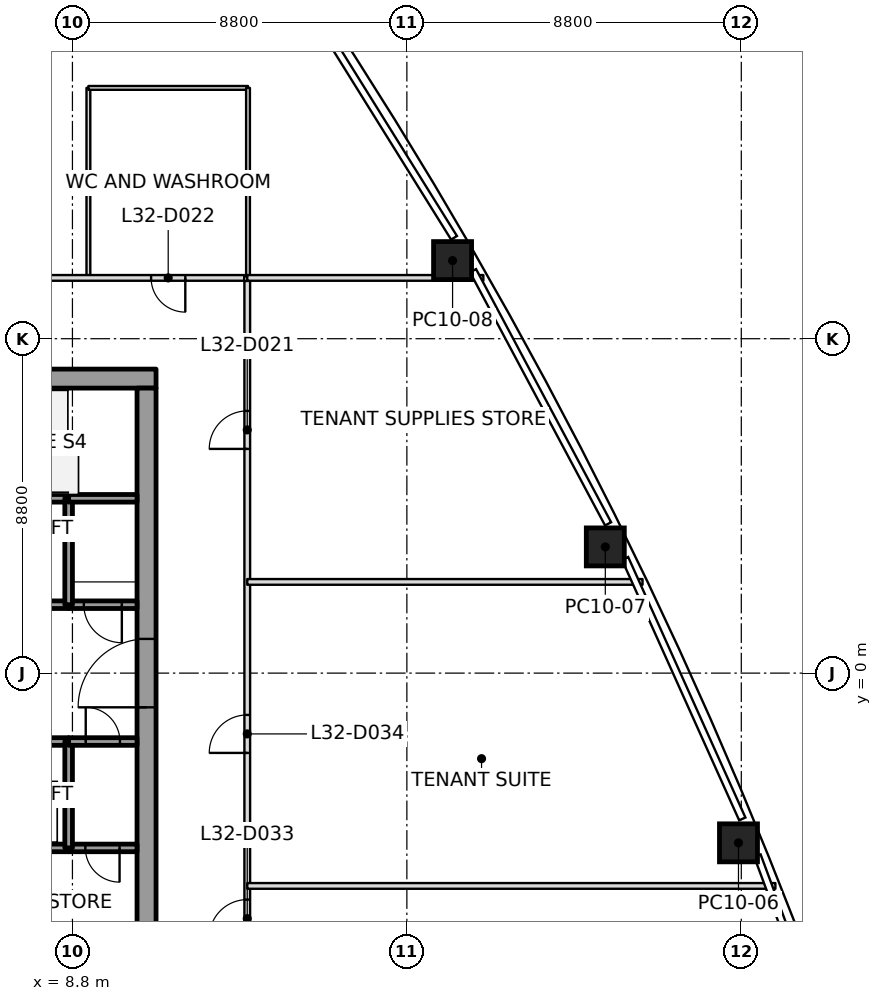
"""IFC4 building model, lengths in metres.
Left out: names, types, materials, properties, quantities, classifications, styles, units other than length and angle.
Written with IfcOpenShell. Run it as: python <this file> out.ifc"""

import sys

from ifc_helpers import new_model, si_unit, direction, frame, frame_2d, origin, origin_2d, place, context, subcontext, project, spatial, rectangle, extrude, element, fill, save


model = new_model("IFC4")
c1 = context("Model", 3, precision=1e-05, world=origin(), true_north=direction((0.0, 1.0)))
c2 = subcontext(c1, "Body", "Model", "MODEL_VIEW")
j1 = project(units=[si_unit("LENGTHUNIT", "METRE"), si_unit("PLANEANGLEUNIT", "RADIAN")], contexts=[c1])
p1 = place(None, origin())
s1 = spatial("IfcSite", under=j1, at=p1, CompositionType="ELEMENT")
p2 = place(p1, origin())
s2 = spatial("IfcBuilding", under=s1, at=p2, CompositionType="ELEMENT")
p3 = place(p2, frame((0.0, 0.0, 149.8)))
s3 = spatial("IfcBuildingStorey", under=s2, at=p3, CompositionType="ELEMENT", Elevation=149.8)
p4 = place(p3, frame((26.326, -4.466, 0.0), z_axis=(-0.017879535448, 0.010068680372, 0.999789449778), x_axis=(-0.379426178831, 0.925081893574, -0.016101707937)))
e1 = element("IfcColumn", 1, at=p4, inside=s3, PredefinedType="COLUMN", context=c2, shape_type="SweptSolid", body=[
    extrude(rectangle(XDim=1.0, YDim=1.0, at=origin_2d()), origin(), (0.0, 0.0, 1.0), 4.001),
])
p5 = place(p3, frame((22.822, 3.321, 0.0), z_axis=(-0.014097689605, 0.002074984617, 0.999898469639), x_axis=(-0.440692979973, 0.897621564819, -0.008076123754)))
e2 = element("IfcColumn", 2, at=p5, inside=s3, PredefinedType="COLUMN", context=c2, shape_type="SweptSolid", body=[
    extrude(rectangle(XDim=1.0, YDim=1.0, at=origin_2d()), origin(), (0.0, 0.0, 1.0), 4.0),
])
p6 = place(p3, frame((18.802, 10.856, 0.0), z_axis=(-0.009826027463, -0.005675904062, 0.999935614576), x_axis=(-0.499975861713, 0.866039339578, 2.779837e-06)))
e3 = element("IfcColumn", 3, at=p6, inside=s3, PredefinedType="COLUMN", context=c2, shape_type="SweptSolid", body=[
    extrude(rectangle(XDim=1.0, YDim=1.0, at=origin_2d()), origin(), (0.0, 0.0, 1.0), 4.0),
])
p7 = place(p3, frame((-11.0, 7.75, 0.0), z_axis=(0.0, 0.0, 1.0), x_axis=(1.0, 0.0, 0.0)))
e4 = element("IfcWall", 4, at=p7, inside=s3, PredefinedType="SHEAR", context=c2, shape_type="SweptSolid", body=[
    extrude(rectangle(XDim=22.0, YDim=0.5, at=frame_2d((11.0, 0.0))), origin(), (0.0, 0.0, 1.0), 4.0),
])
p8 = place(p7, frame((10.45, 0.0, 0.0)))
e5 = element("IfcOpeningElement", 5, at=p8, cuts=e4, PredefinedType="OPENING", context=c2, shape_type="SweptSolid", body=[
    extrude(rectangle(XDim=1.1, YDim=2.1, at=frame_2d((0.55, 1.05))), frame((0.0, 0.25, 0.0), z_axis=(0.0, -1.0, 0.0), x_axis=(1.0, 0.0, 0.0)), (0.0, 0.0, 1.0), 0.5),
])
p9 = place(p3, frame((10.75, -7.5, 0.0), z_axis=(0.0, 0.0, 1.0), x_axis=(0.0, 1.0, 0.0)))
e6 = element("IfcWall", 6, at=p9, inside=s3, PredefinedType="SHEAR", context=c2, shape_type="SweptSolid", body=[
    extrude(rectangle(XDim=15.0, YDim=0.5, at=frame_2d((7.5, 0.0))), origin(), (0.0, 0.0, 1.0), 4.0),
])
p10 = place(p9, frame((6.6, 0.0, 0.0)))
e7 = element("IfcOpeningElement", 7, at=p10, cuts=e6, PredefinedType="OPENING", context=c2, shape_type="SweptSolid", body=[
    extrude(rectangle(XDim=1.8, YDim=2.1, at=frame_2d((0.9, 1.05))), frame((0.0, 0.25, 0.0), z_axis=(0.0, -1.0, 0.0), x_axis=(1.0, 0.0, 0.0)), (0.0, 0.0, 1.0), 0.5),
])
p11 = place(p3, frame((8.7, -4.6, 0.0), z_axis=(0.0, 0.0, 1.0), x_axis=(-1.0, 0.0, 0.0)))
e8 = element("IfcWall", 8, at=p11, inside=s3, PredefinedType="SOLIDWALL", context=c2, shape_type="SweptSolid", body=[
    extrude(rectangle(XDim=2.6, YDim=0.2, at=frame_2d((1.3, 0.0))), origin(), (0.0, 0.0, 1.0), 3.85),
])
p12 = place(p3, frame((6.1, -1.8, 0.0), z_axis=(0.0, 0.0, 1.0), x_axis=(1.0, 0.0, 0.0)))
e9 = element("IfcWall", 9, at=p12, inside=s3, PredefinedType="SOLIDWALL", context=c2, shape_type="SweptSolid", body=[
    extrude(rectangle(XDim=2.6, YDim=0.2, at=frame_2d((1.3, 0.0))), origin(), (0.0, 0.0, 1.0), 3.85),
])
p13 = place(p12, frame((0.75, 0.0, 0.0)))
e10 = element("IfcOpeningElement", 10, at=p13, cuts=e9, PredefinedType="OPENING", context=c2, shape_type="SweptSolid", body=[
    extrude(rectangle(XDim=1.1, YDim=2.1, at=frame_2d((0.55, 1.05))), frame((0.0, 0.1, 0.0), z_axis=(0.0, -1.0, 0.0), x_axis=(1.0, 0.0, 0.0)), (0.0, 0.0, 1.0), 0.2),
])
for number, where, z_axis, x_axis in (
    (11, (8.7, 1.8, 0.0), (0.0, 0.0, 1.0), (-1.0, 0.0, 0.0)),
    (12, (8.7, 4.6, 0.0), (0.0, 0.0, 1.0), (-1.0, 0.0, 0.0)),
):
    element("IfcWall", number, at=place(p3, frame(where, z_axis=z_axis, x_axis=x_axis)), inside=s3, PredefinedType="SOLIDWALL", context=c2, shape_type="SweptSolid", body=[
        extrude(rectangle(XDim=2.6, YDim=0.2, at=frame_2d((1.3, 0.0))), origin(), (0.0, 0.0, 1.0), 3.85),
    ])
p14 = place(p3, frame((10.5, -4.6, 0.0), z_axis=(0.0, 0.0, 1.0), x_axis=(-1.0, 0.0, 0.0)))
e13 = element("IfcWall", 13, at=p14, inside=s3, PredefinedType="SOLIDWALL", context=c2, shape_type="SweptSolid", body=[
    extrude(rectangle(XDim=1.8, YDim=0.2, at=frame_2d((0.9, 0.0))), origin(), (0.0, 0.0, 1.0), 3.85),
])
p15 = place(p14, frame((0.46, 0.0, 0.0)))
e14 = element("IfcOpeningElement", 14, at=p15, cuts=e13, PredefinedType="OPENING", context=c2, shape_type="SweptSolid", body=[
    extrude(rectangle(XDim=0.9, YDim=2.1, at=frame_2d((0.45, 1.05))), frame((0.0, 0.1, 0.0), z_axis=(0.0, -1.0, 0.0), x_axis=(1.0, 0.0, 0.0)), (0.0, 0.0, 1.0), 0.2),
])
p16 = place(p3, frame((8.7, -1.8, 0.0), z_axis=(0.0, 0.0, 1.0), x_axis=(0.0, -1.0, 0.0)))
e15 = element("IfcWall", 15, at=p16, inside=s3, PredefinedType="SOLIDWALL", context=c2, shape_type="SweptSolid", body=[
    extrude(rectangle(XDim=2.8, YDim=0.2, at=frame_2d((1.4, 0.0))), origin(), (0.0, 0.0, 1.0), 3.85),
])
p17 = place(p3, frame((8.7, -1.8, 0.0), z_axis=(0.0, 0.0, 1.0), x_axis=(1.0, 0.0, 0.0)))
e16 = element("IfcWall", 16, at=p17, inside=s3, PredefinedType="SOLIDWALL", context=c2, shape_type="SweptSolid", body=[
    extrude(rectangle(XDim=1.8, YDim=0.2, at=frame_2d((0.9, 0.0))), origin(), (0.0, 0.0, 1.0), 3.85),
])
p18 = place(p17, frame((0.45, 0.0, 0.0)))
e17 = element("IfcOpeningElement", 17, at=p18, cuts=e16, PredefinedType="OPENING", context=c2, shape_type="SweptSolid", body=[
    extrude(rectangle(XDim=0.9, YDim=2.1, at=frame_2d((0.45, 1.05))), frame((0.0, 0.1, 0.0), z_axis=(0.0, -1.0, 0.0), x_axis=(1.0, 0.0, 0.0)), (0.0, 0.0, 1.0), 0.2),
])
p19 = place(p3, frame((10.5, 1.8, 0.0), z_axis=(0.0, 0.0, 1.0), x_axis=(-1.0, 0.0, 0.0)))
e18 = element("IfcWall", 18, at=p19, inside=s3, PredefinedType="SOLIDWALL", context=c2, shape_type="SweptSolid", body=[
    extrude(rectangle(XDim=1.8, YDim=0.2, at=frame_2d((0.9, 0.0))), origin(), (0.0, 0.0, 1.0), 3.85),
])
p20 = place(p19, frame((0.4, 0.0, 0.0)))
e19 = element("IfcOpeningElement", 19, at=p20, cuts=e18, PredefinedType="OPENING", context=c2, shape_type="SweptSolid", body=[
    extrude(rectangle(XDim=1.0, YDim=2.1, at=frame_2d((0.5, 1.05))), frame((0.0, 0.1, 0.0), z_axis=(0.0, -1.0, 0.0), x_axis=(1.0, 0.0, 0.0)), (0.0, 0.0, 1.0), 0.2),
])
p21 = place(p3, frame((8.7, 4.6, 0.0), z_axis=(0.0, 0.0, 1.0), x_axis=(0.0, -1.0, 0.0)))
e20 = element("IfcWall", 20, at=p21, inside=s3, PredefinedType="SOLIDWALL", context=c2, shape_type="SweptSolid", body=[
    extrude(rectangle(XDim=2.8, YDim=0.2, at=frame_2d((1.4, 0.0))), origin(), (0.0, 0.0, 1.0), 3.85),
])
p22 = place(p3, frame((10.5, 4.6, 0.0), z_axis=(0.0, 0.0, 1.0), x_axis=(-1.0, 0.0, 0.0)))
e21 = element("IfcWall", 21, at=p22, inside=s3, PredefinedType="SOLIDWALL", context=c2, shape_type="SweptSolid", body=[
    extrude(rectangle(XDim=1.8, YDim=0.2, at=frame_2d((0.9, 0.0))), origin(), (0.0, 0.0, 1.0), 3.85),
])
p23 = place(p3, frame((13.4, -5.6, 0.0), z_axis=(0.0, 0.0, 1.0), x_axis=(1.0, 0.0, 0.0)))
e22 = element("IfcWall", 22, at=p23, inside=s3, PredefinedType="PARTITIONING", context=c2, shape_type="SweptSolid", body=[
    extrude(rectangle(XDim=13.897, YDim=0.15, at=frame_2d((6.949, 0.0))), origin(), (0.0, 0.0, 1.0), 3.234),
])
p24 = place(p3, frame((23.801, 2.4, 0.0), z_axis=(0.0, 0.0, 1.0), x_axis=(-1.0, 0.0, 0.0)))
e23 = element("IfcWall", 23, at=p24, inside=s3, PredefinedType="PARTITIONING", context=c2, shape_type="SweptSolid", body=[
    extrude(rectangle(XDim=10.401, YDim=0.15, at=frame_2d((5.201, 0.0))), origin(), (0.0, 0.0, 1.0), 3.234),
])
p25 = place(p3, frame((13.4, 10.4, 0.0), z_axis=(0.0, 0.0, 1.0), x_axis=(1.0, 0.0, 0.0)))
e24 = element("IfcWall", 24, at=p25, inside=s3, PredefinedType="PARTITIONING", context=c2, shape_type="SweptSolid", body=[
    extrude(rectangle(XDim=6.213, YDim=0.15, at=frame_2d((3.106, 0.0))), origin(), (0.0, 0.0, 1.0), 3.234),
])
p26 = place(p3, frame((13.32, 10.4, 0.0), z_axis=(0.0, 0.0, 1.0), x_axis=(-1.0, 0.0, 0.0)))
e25 = element("IfcWall", 25, at=p26, inside=s3, PredefinedType="PARTITIONING", context=c2, shape_type="SweptSolid", body=[
    extrude(rectangle(XDim=26.64, YDim=0.15, at=frame_2d((13.32, 0.0))), origin(), (0.0, 0.0, 1.0), 3.166),
])
p27 = place(p26, frame((1.55, 0.0, 0.0)))
e26 = element("IfcOpeningElement", 26, at=p27, cuts=e25, PredefinedType="OPENING", context=c2, shape_type="SweptSolid", body=[
    extrude(rectangle(XDim=0.9, YDim=2.1, at=frame_2d((0.45, 1.05))), frame((0.0, 0.075, 0.0), z_axis=(0.0, -1.0, 0.0), x_axis=(1.0, 0.0, 0.0)), (0.0, 0.0, 1.0), 0.15),
])
p28 = place(p26, frame((6.96, 0.0, 0.0)))
e27 = element("IfcOpeningElement", 27, at=p28, cuts=e25, PredefinedType="OPENING", context=c2, shape_type="SweptSolid", body=[
    extrude(rectangle(XDim=1.0, YDim=2.1, at=frame_2d((0.5, 1.05))), frame((0.0, 0.075, 0.0), z_axis=(0.0, -1.0, 0.0), x_axis=(1.0, 0.0, 0.0)), (0.0, 0.0, 1.0), 0.15),
])
p29 = place(p26, frame((14.22, 0.0, 0.0)))
e28 = element("IfcOpeningElement", 28, at=p29, cuts=e25, PredefinedType="OPENING", context=c2, shape_type="SweptSolid", body=[
    extrude(rectangle(XDim=1.0, YDim=2.1, at=frame_2d((0.5, 1.05))), frame((0.0, 0.075, 0.0), z_axis=(0.0, -1.0, 0.0), x_axis=(1.0, 0.0, 0.0)), (0.0, 0.0, 1.0), 0.15),
])
p30 = place(p26, frame((22.23, 0.0, 0.0)))
e29 = element("IfcOpeningElement", 29, at=p30, cuts=e25, PredefinedType="OPENING", context=c2, shape_type="SweptSolid", body=[
    extrude(rectangle(XDim=1.0, YDim=2.1, at=frame_2d((0.5, 1.05))), frame((0.0, 0.075, 0.0), z_axis=(0.0, -1.0, 0.0), x_axis=(1.0, 0.0, 0.0)), (0.0, 0.0, 1.0), 0.15),
])
p31 = place(p3, frame((13.4, -10.32, 0.0), z_axis=(0.0, 0.0, 1.0), x_axis=(0.0, 1.0, 0.0)))
e30 = element("IfcWall", 30, at=p31, inside=s3, PredefinedType="PARTITIONING", context=c2, shape_type="SweptSolid", body=[
    extrude(rectangle(XDim=20.64, YDim=0.15, at=frame_2d((10.32, 0.0))), origin(), (0.0, 0.0, 1.0), 3.166),
])
p32 = place(p31, frame((16.22, 0.0, 0.0)))
e31 = element("IfcOpeningElement", 31, at=p32, cuts=e30, PredefinedType="OPENING", context=c2, shape_type="SweptSolid", body=[
    extrude(rectangle(XDim=1.0, YDim=2.1, at=frame_2d((0.5, 1.05))), frame((0.0, 0.075, 0.0), z_axis=(0.0, -1.0, 0.0), x_axis=(1.0, 0.0, 0.0)), (0.0, 0.0, 1.0), 0.15),
])
p33 = place(p31, frame((0.95, 0.0, 0.0)))
e32 = element("IfcOpeningElement", 32, at=p33, cuts=e30, PredefinedType="OPENING", context=c2, shape_type="SweptSolid", body=[
    extrude(rectangle(XDim=0.9, YDim=2.1, at=frame_2d((0.45, 1.05))), frame((0.0, 0.075, 0.0), z_axis=(0.0, -1.0, 0.0), x_axis=(1.0, 0.0, 0.0)), (0.0, 0.0, 1.0), 0.15),
])
p34 = place(p31, frame((3.36, 0.0, 0.0)))
e33 = element("IfcOpeningElement", 33, at=p34, cuts=e30, PredefinedType="OPENING", context=c2, shape_type="SweptSolid", body=[
    extrude(rectangle(XDim=1.0, YDim=2.1, at=frame_2d((0.5, 1.05))), frame((0.0, 0.075, 0.0), z_axis=(0.0, -1.0, 0.0), x_axis=(1.0, 0.0, 0.0)), (0.0, 0.0, 1.0), 0.15),
])
p35 = place(p31, frame((8.22, 0.0, 0.0)))
e34 = element("IfcOpeningElement", 34, at=p35, cuts=e30, PredefinedType="OPENING", context=c2, shape_type="SweptSolid", body=[
    extrude(rectangle(XDim=1.0, YDim=2.1, at=frame_2d((0.5, 1.05))), frame((0.0, 0.075, 0.0), z_axis=(0.0, -1.0, 0.0), x_axis=(1.0, 0.0, 0.0)), (0.0, 0.0, 1.0), 0.15),
])
p36 = place(p3, frame((9.22, 10.43, 0.0), z_axis=(0.0, 0.0, 1.0), x_axis=(0.0, 1.0, 0.0)))
e35 = element("IfcWall", 35, at=p36, inside=s3, PredefinedType="PARTITIONING", context=c2, shape_type="SweptSolid", body=[
    extrude(rectangle(XDim=4.97, YDim=0.1, at=frame_2d((2.485, 0.0))), origin(), (0.0, 0.0, 1.0), 3.247),
])
p37 = place(p3, frame((9.22, 15.4, 0.0), z_axis=(0.0, 0.0, 1.0), x_axis=(1.0, 0.0, 0.0)))
e36 = element("IfcWall", 36, at=p37, inside=s3, PredefinedType="PARTITIONING", context=c2, shape_type="SweptSolid", body=[
    extrude(rectangle(XDim=4.2, YDim=0.1, at=frame_2d((2.1, 0.0))), origin(), (0.0, 0.0, 1.0), 3.45),
])
p38 = place(p3, frame((13.42, 15.4, 0.0), z_axis=(0.0, 0.0, 1.0), x_axis=(0.0, -1.0, 0.0)))
e37 = element("IfcWall", 37, at=p38, inside=s3, PredefinedType="PARTITIONING", context=c2, shape_type="SweptSolid", body=[
    extrude(rectangle(XDim=4.97, YDim=0.1, at=frame_2d((2.485, 0.0))), origin(), (0.0, 0.0, 1.0), 3.247),
])
p39 = place(p32, origin())
e38 = element("IfcDoor", 38, at=p39, inside=s3, OperationType="SINGLE_SWING_LEFT", PredefinedType="DOOR", context=c2, shape_type="SweptSolid", body=[
    extrude(rectangle(XDim=1.0, YDim=2.1, at=frame_2d((0.5, 1.05))), frame((0.0, 0.025, 0.0), z_axis=(0.0, -1.0, 0.0), x_axis=(1.0, 0.0, 0.0)), (0.0, 0.0, 1.0), 0.05),
])
fill(e31, e38)
p40 = place(p27, origin())
e39 = element("IfcDoor", 39, at=p40, inside=s3, OperationType="SINGLE_SWING_RIGHT", PredefinedType="DOOR", context=c2, shape_type="SweptSolid", body=[
    extrude(rectangle(XDim=0.9, YDim=2.1, at=frame_2d((0.45, 1.05))), frame((0.0, 0.025, 0.0), z_axis=(0.0, -1.0, 0.0), x_axis=(1.0, 0.0, 0.0)), (0.0, 0.0, 1.0), 0.05),
])
fill(e26, e39)
p41 = place(p34, origin())
e40 = element("IfcDoor", 40, at=p41, inside=s3, OperationType="SINGLE_SWING_RIGHT", PredefinedType="DOOR", context=c2, shape_type="SweptSolid", body=[
    extrude(rectangle(XDim=1.0, YDim=2.1, at=frame_2d((0.5, 1.05))), frame((0.0, 0.025, 0.0), z_axis=(0.0, -1.0, 0.0), x_axis=(1.0, 0.0, 0.0)), (0.0, 0.0, 1.0), 0.05),
])
fill(e33, e40)
p42 = place(p35, origin())
e41 = element("IfcDoor", 41, at=p42, inside=s3, OperationType="SINGLE_SWING_LEFT", PredefinedType="DOOR", context=c2, shape_type="SweptSolid", body=[
    extrude(rectangle(XDim=1.0, YDim=2.1, at=frame_2d((0.5, 1.05))), frame((0.0, 0.025, 0.0), z_axis=(0.0, -1.0, 0.0), x_axis=(1.0, 0.0, 0.0)), (0.0, 0.0, 1.0), 0.05),
])
fill(e34, e41)
p43 = place(p20, origin())
e42 = element("IfcDoor", 42, at=p43, inside=s3, OperationType="SINGLE_SWING_LEFT", PredefinedType="DOOR", context=c2, shape_type="SweptSolid", body=[
    extrude(rectangle(XDim=1.0, YDim=2.1, at=frame_2d((0.5, 1.05))), frame((0.0, 0.025, 0.0), z_axis=(0.0, -1.0, 0.0), x_axis=(1.0, 0.0, 0.0)), (0.0, 0.0, 1.0), 0.05),
])
fill(e19, e42)
p44 = place(p15, origin())
e43 = element("IfcDoor", 43, at=p44, inside=s3, OperationType="SINGLE_SWING_LEFT", PredefinedType="DOOR", context=c2, shape_type="SweptSolid", body=[
    extrude(rectangle(XDim=0.9, YDim=2.1, at=frame_2d((0.45, 1.05))), frame((0.0, 0.025, 0.0), z_axis=(0.0, -1.0, 0.0), x_axis=(1.0, 0.0, 0.0)), (0.0, 0.0, 1.0), 0.05),
])
fill(e14, e43)
p45 = place(p18, origin())
e44 = element("IfcDoor", 44, at=p45, inside=s3, OperationType="SINGLE_SWING_LEFT", PredefinedType="DOOR", context=c2, shape_type="SweptSolid", body=[
    extrude(rectangle(XDim=0.9, YDim=2.1, at=frame_2d((0.45, 1.05))), frame((0.0, 0.025, 0.0), z_axis=(0.0, -1.0, 0.0), x_axis=(1.0, 0.0, 0.0)), (0.0, 0.0, 1.0), 0.05),
])
fill(e17, e44)
p46 = place(p10, origin())
e45 = element("IfcDoor", 45, at=p46, inside=s3, OperationType="DOUBLE_DOOR_SINGLE_SWING", PredefinedType="DOOR", context=c2, shape_type="SweptSolid", body=[
    extrude(rectangle(XDim=1.8, YDim=2.1, at=frame_2d((0.9, 1.05))), frame((0.0, 0.025, 0.0), z_axis=(0.0, -1.0, 0.0), x_axis=(1.0, 0.0, 0.0)), (0.0, 0.0, 1.0), 0.05),
])
fill(e7, e45)
save(model, sys.argv[1])
